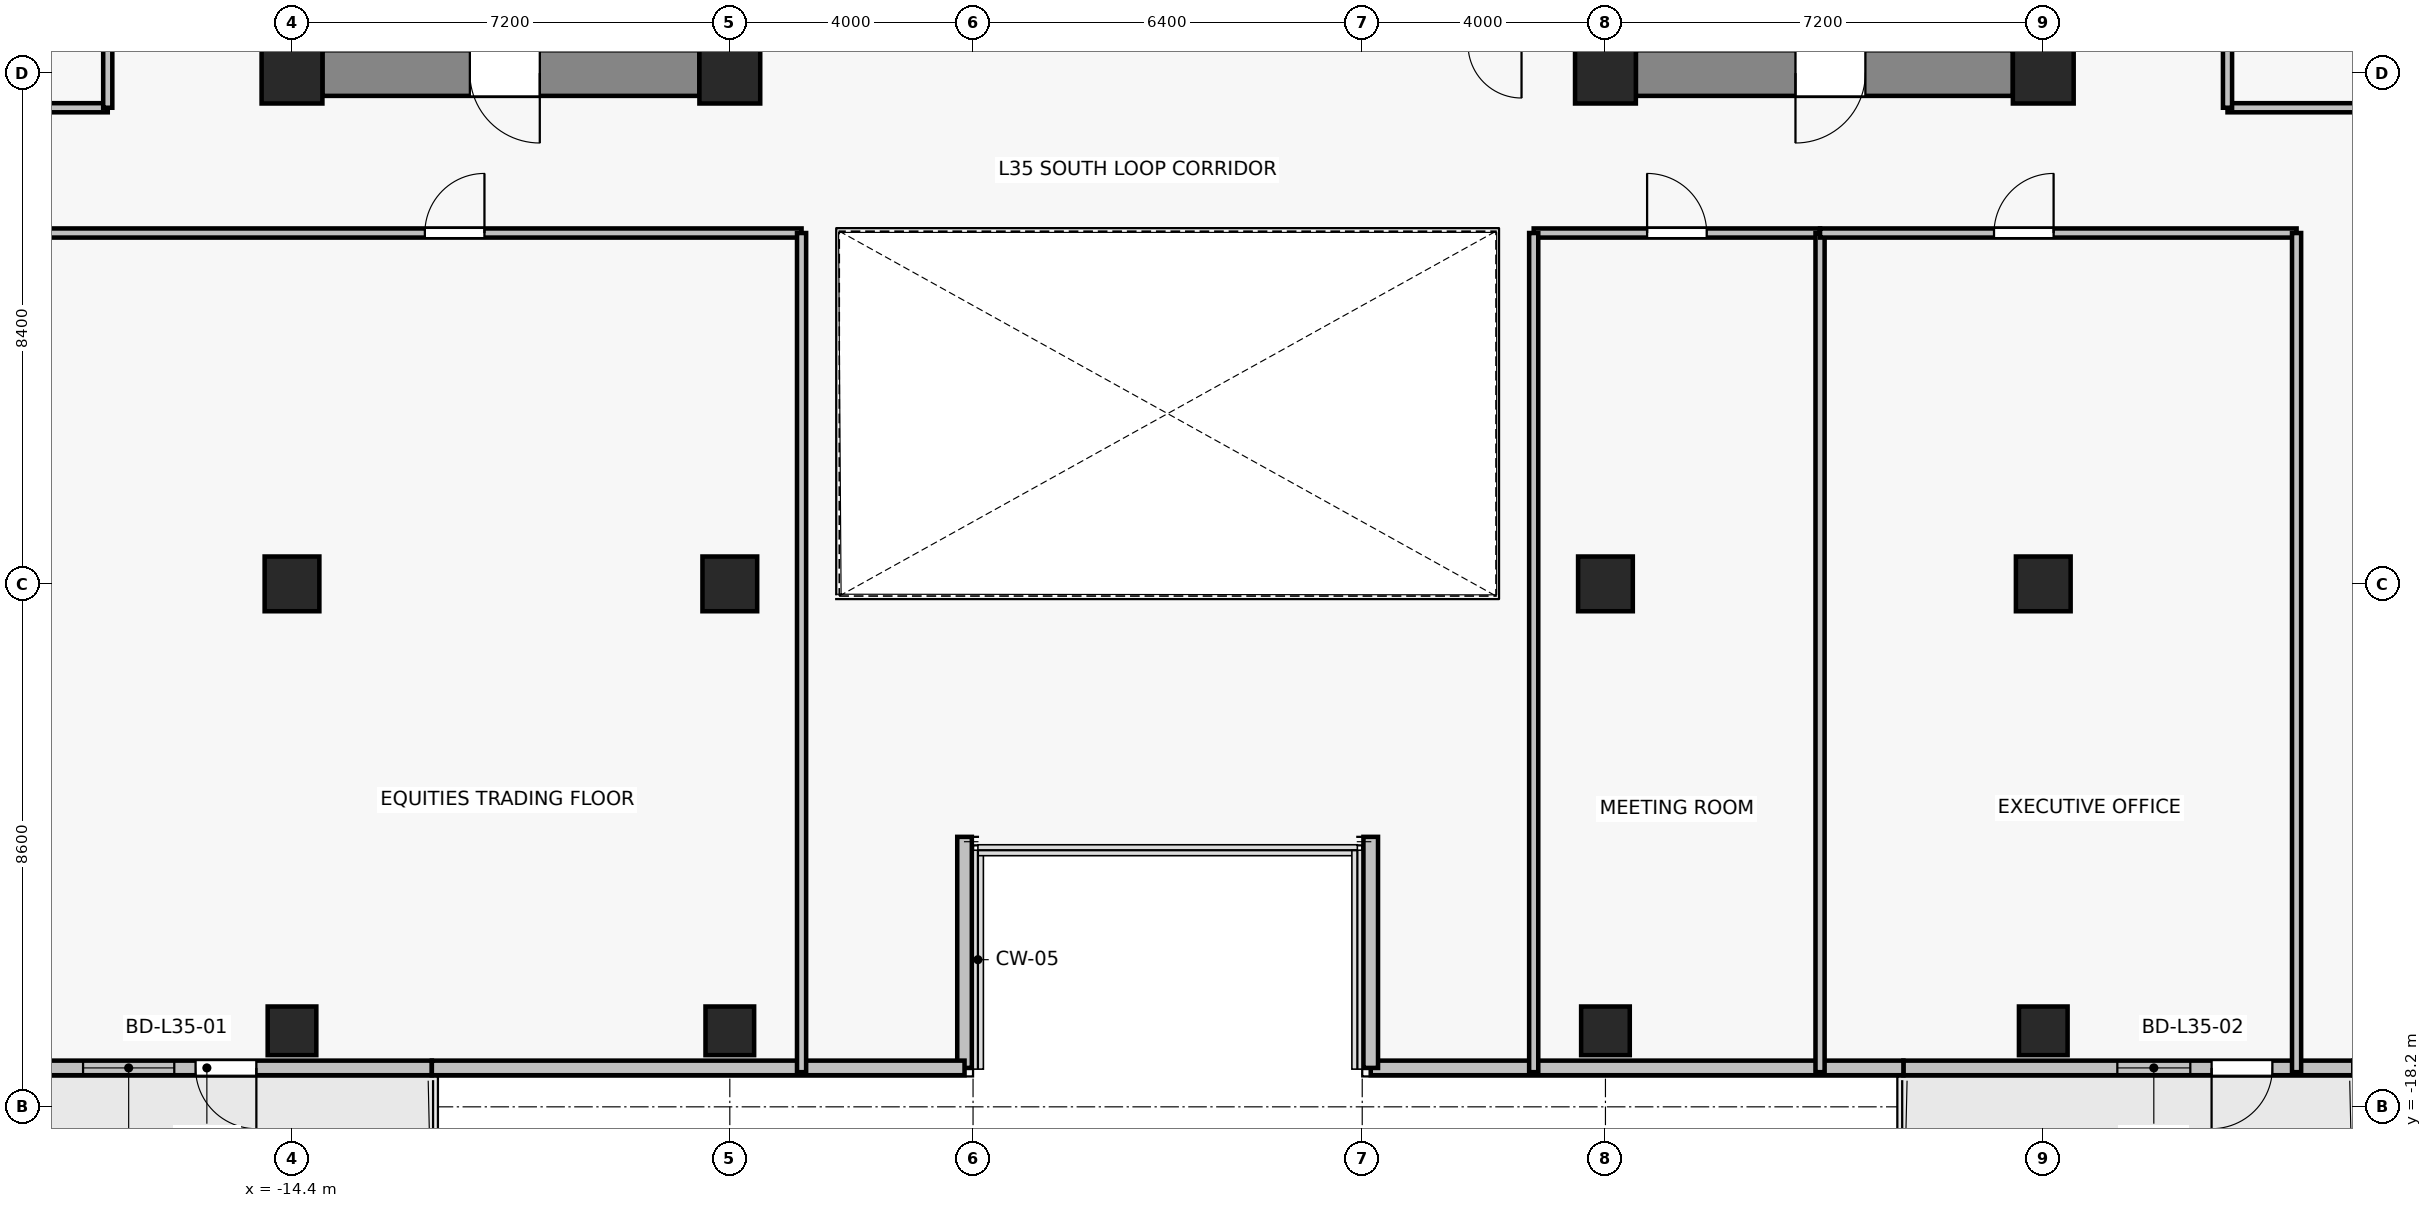
"""IFC4 building model, lengths in metres.
Left out: names, types, materials, properties, quantities, classifications, styles, units other than length and angle.
Written with IfcOpenShell. Run it as: python <this file> out.ifc"""

import sys

from ifc_helpers import new_model, si_unit, direction, frame, frame_2d, origin, origin_2d, place, context, subcontext, project, spatial, rectangle, extrude, source, transform, mapped, element, fill, save


model = new_model("IFC4")
c1 = context("Model", 3, precision=1e-05, world=origin(), true_north=direction((0.0, 1.0)))
c2 = subcontext(c1, "Body", "Model", "MODEL_VIEW")
j1 = project(units=[si_unit("LENGTHUNIT", "METRE"), si_unit("PLANEANGLEUNIT", "RADIAN")], contexts=[c1])
p1 = place(None, origin())
s1 = spatial("IfcSite", under=j1, at=p1, CompositionType="ELEMENT")
p2 = place(p1, origin())
s2 = spatial("IfcBuilding", under=s1, at=p2, CompositionType="ELEMENT")
p3 = place(p2, frame((0.0, 0.0, 126.4)))
s3 = spatial("IfcBuildingStorey", under=s2, at=p3, CompositionType="ELEMENT", Elevation=126.4)
for number, where, z_axis, x_axis in (
    (1, (-14.4, -1.2, 0.0), (0.0, 0.0, 1.0), (1.0, 0.0, 0.0)),
    (2, (-7.2, -1.2, 0.0), (0.0, 0.0, 1.0), (1.0, 0.0, 0.0)),
    (3, (7.2, -1.2, 0.0), (0.0, 0.0, 1.0), (1.0, 0.0, 0.0)),
    (4, (14.4, -1.2, 0.0), (0.0, 0.0, 1.0), (1.0, 0.0, 0.0)),
):
    element("IfcColumn", number, at=place(p3, frame(where, z_axis=z_axis, x_axis=x_axis)), inside=s3, PredefinedType="COLUMN", context=c2, shape_type="SweptSolid", body=[
        extrude(rectangle(XDim=1.0, YDim=1.0, at=origin_2d()), origin(), (0.0, 0.0, 1.0), 3.3),
    ])
for number, where, z_axis, x_axis in (
    (5, (-14.4, -9.6, 0.0), (0.0, 0.0, 1.0), (1.0, 0.0, 0.0)),
    (6, (-7.2, -9.6, 0.0), (0.0, 0.0, 1.0), (1.0, 0.0, 0.0)),
    (7, (7.2, -9.6, 0.0), (0.0, 0.0, 1.0), (1.0, 0.0, 0.0)),
    (8, (14.4, -9.6, 0.0), (0.0, 0.0, 1.0), (1.0, 0.0, 0.0)),
):
    element("IfcColumn", number, at=place(p3, frame(where, z_axis=z_axis, x_axis=x_axis)), inside=s3, PredefinedType="COLUMN", context=c2, shape_type="SweptSolid", body=[
        extrude(rectangle(XDim=0.9, YDim=0.9, at=origin_2d()), origin(), (0.0, 0.0, 1.0), 3.3),
    ])
for number, where, z_axis, x_axis in (
    (9, (-14.4, -16.95, 0.0), (0.0, 0.0, 1.0), (1.0, 0.0, 0.0)),
    (10, (-7.2, -16.95, 0.0), (0.0, 0.0, 1.0), (1.0, 0.0, 0.0)),
    (11, (7.2, -16.95, 0.0), (0.0, 0.0, 1.0), (1.0, 0.0, 0.0)),
    (12, (14.4, -16.95, 0.0), (0.0, 0.0, 1.0), (1.0, 0.0, 0.0)),
):
    element("IfcColumn", number, at=place(p3, frame(where, z_axis=z_axis, x_axis=x_axis)), inside=s3, PredefinedType="COLUMN", context=c2, shape_type="SweptSolid", body=[
        extrude(rectangle(XDim=0.8, YDim=0.8, at=origin_2d()), origin(), (0.0, 0.0, 1.0), 3.3),
    ])
p4 = place(p3, frame((-7.7, -1.2, 0.0), z_axis=(0.0, 0.0, 1.0), x_axis=(-1.0, 0.0, 0.0)))
e13 = element("IfcWall", 13, at=p4, inside=s3, PredefinedType="SHEAR", context=c2, shape_type="SweptSolid", body=[
    extrude(rectangle(XDim=6.2, YDim=0.75, at=frame_2d((3.1, 0.0))), origin(), (0.0, 0.0, 1.0), 3.075),
])
p5 = place(p4, frame((2.625, 0.0, 0.0)))
e14 = element("IfcOpeningElement", 14, at=p5, cuts=e13, PredefinedType="OPENING", context=c2, shape_type="SweptSolid", body=[
    extrude(rectangle(XDim=1.15, YDim=2.15, at=frame_2d((0.575, 1.075))), frame((0.0, 0.385, 0.0), z_axis=(0.0, -1.0, 0.0), x_axis=(1.0, 0.0, 0.0)), (0.0, 0.0, 1.0), 0.77),
])
p6 = place(p3, frame((13.9, -1.2, 0.0), z_axis=(0.0, 0.0, 1.0), x_axis=(-1.0, 0.0, 0.0)))
e15 = element("IfcWall", 15, at=p6, inside=s3, PredefinedType="SHEAR", context=c2, shape_type="SweptSolid", body=[
    extrude(rectangle(XDim=6.2, YDim=0.75, at=frame_2d((3.1, 0.0))), origin(), (0.0, 0.0, 1.0), 3.075),
])
p7 = place(p6, frame((2.425, 0.0, 0.0)))
e16 = element("IfcOpeningElement", 16, at=p7, cuts=e15, PredefinedType="OPENING", context=c2, shape_type="SweptSolid", body=[
    extrude(rectangle(XDim=1.15, YDim=2.15, at=frame_2d((0.575, 1.075))), frame((0.0, 0.385, 0.0), z_axis=(0.0, -1.0, 0.0), x_axis=(1.0, 0.0, 0.0)), (0.0, 0.0, 1.0), 0.77),
])
p8 = place(p3, frame((-12.1, -17.56, 0.0), z_axis=(0.0, 0.0, 1.0), x_axis=(-1.0, 0.0, 0.0)))
e17 = element("IfcWall", 17, at=p8, inside=s3, PredefinedType="SOLIDWALL", context=c2, shape_type="SweptSolid", body=[
    extrude(rectangle(XDim=7.4, YDim=0.24, at=frame_2d((3.7, 0.0))), origin(), (0.0, 0.0, 1.0), 2.665),
])
p9 = place(p8, frame((2.886, 0.0, 0.0)))
e18 = element("IfcOpeningElement", 18, at=p9, cuts=e17, PredefinedType="OPENING", context=c2, shape_type="SweptSolid", body=[
    extrude(rectangle(XDim=1.0, YDim=2.2, at=frame_2d((0.5, 1.1))), frame((0.0, 0.13, 0.0), z_axis=(0.0, -1.0, 0.0), x_axis=(1.0, 0.0, 0.0)), (0.0, 0.0, 1.0), 0.26),
])
p10 = place(p8, frame((4.236, 0.0, 0.85)))
e19 = element("IfcOpeningElement", 19, at=p10, cuts=e17, PredefinedType="OPENING", context=c2, shape_type="SweptSolid", body=[
    extrude(rectangle(XDim=1.5, YDim=1.6, at=frame_2d((0.75, 0.8))), frame((0.0, 0.13, 0.0), z_axis=(0.0, -1.0, 0.0), x_axis=(1.0, 0.0, 0.0)), (0.0, 0.0, 1.0), 0.26),
])
p11 = place(p3, frame((19.5, -17.56, 0.0), z_axis=(0.0, 0.0, 1.0), x_axis=(-1.0, 0.0, 0.0)))
e20 = element("IfcWall", 20, at=p11, inside=s3, PredefinedType="SOLIDWALL", context=c2, shape_type="SweptSolid", body=[
    extrude(rectangle(XDim=7.4, YDim=0.24, at=frame_2d((3.7, 0.0))), origin(), (0.0, 0.0, 1.0), 2.665),
])
p12 = place(p11, frame((1.332, 0.0, 0.0)))
e21 = element("IfcOpeningElement", 21, at=p12, cuts=e20, PredefinedType="OPENING", context=c2, shape_type="SweptSolid", body=[
    extrude(rectangle(XDim=1.0, YDim=2.2, at=frame_2d((0.5, 1.1))), frame((0.0, 0.13, 0.0), z_axis=(0.0, -1.0, 0.0), x_axis=(1.0, 0.0, 0.0)), (0.0, 0.0, 1.0), 0.26),
])
p13 = place(p11, frame((2.682, 0.0, 0.85)))
e22 = element("IfcOpeningElement", 22, at=p13, cuts=e20, PredefinedType="OPENING", context=c2, shape_type="SweptSolid", body=[
    extrude(rectangle(XDim=1.2, YDim=1.5, at=frame_2d((0.6, 0.75))), frame((0.0, 0.13, 0.0), z_axis=(0.0, -1.0, 0.0), x_axis=(1.0, 0.0, 0.0)), (0.0, 0.0, 1.0), 0.26),
])
p14 = place(p3, frame((3.34, -17.56, 0.0), z_axis=(0.0, 0.0, 1.0), x_axis=(1.0, 0.0, 0.0)))
e23 = element("IfcWall", 23, at=p14, inside=s3, PredefinedType="SOLIDWALL", context=c2, shape_type="SweptSolid", body=[
    extrude(rectangle(XDim=8.76, YDim=0.24, at=frame_2d((4.38, 0.0))), origin(), (0.0, 0.0, 1.0), 3.075),
])
for number, where, z_axis, x_axis in (
    (24, (3.34, -13.76, 0.0), (0.0, 0.0, 1.0), (0.0, -1.0, 0.0)),
    (25, (-3.34, -17.56, 0.0), (0.0, 0.0, 1.0), (0.0, 1.0, 0.0)),
):
    element("IfcWall", number, at=place(p3, frame(where, z_axis=z_axis, x_axis=x_axis)), inside=s3, PredefinedType="SOLIDWALL", context=c2, shape_type="SweptSolid", body=[
        extrude(rectangle(XDim=3.8, YDim=0.24, at=frame_2d((1.9, 0.0))), origin(), (0.0, 0.0, 1.0), 2.515),
    ])
p15 = place(p3, frame((-12.1, -17.56, 0.0), z_axis=(0.0, 0.0, 1.0), x_axis=(1.0, 0.0, 0.0)))
e26 = element("IfcWall", 26, at=p15, inside=s3, PredefinedType="SOLIDWALL", context=c2, shape_type="SweptSolid", body=[
    extrude(rectangle(XDim=8.76, YDim=0.24, at=frame_2d((4.38, 0.0))), origin(), (0.0, 0.0, 1.0), 3.075),
])
p16 = place(p3, frame((-25.53, -3.83, 0.0), z_axis=(0.0, 0.0, 1.0), x_axis=(1.0, 0.0, 0.0)))
e27 = element("IfcWall", 27, at=p16, inside=s3, PredefinedType="PARTITIONING", context=c2, shape_type="SweptSolid", body=[
    extrude(rectangle(XDim=19.51, YDim=0.15, at=frame_2d((9.755, 0.0))), origin(), (0.0, 0.0, 1.0), 2.515),
])
p17 = place(p16, frame((13.315, 0.0, 0.0)))
e28 = element("IfcOpeningElement", 28, at=p17, cuts=e27, PredefinedType="OPENING", context=c2, shape_type="SweptSolid", body=[
    extrude(rectangle(XDim=0.98, YDim=2.15, at=frame_2d((0.49, 1.075))), frame((0.0, 0.085, 0.0), z_axis=(0.0, -1.0, 0.0), x_axis=(1.0, 0.0, 0.0)), (0.0, 0.0, 1.0), 0.17),
])
p18 = place(p3, frame((-6.02, -3.83, 0.0), z_axis=(0.0, 0.0, 1.0), x_axis=(0.0, -1.0, 0.0)))
e29 = element("IfcWall", 29, at=p18, inside=s3, PredefinedType="PARTITIONING", context=c2, shape_type="SweptSolid", body=[
    extrude(rectangle(XDim=13.8, YDim=0.15, at=frame_2d((6.9, 0.0))), origin(), (0.0, 0.0, 1.0), 2.515),
])
p19 = place(p3, frame((6.02, -3.83, 0.0), z_axis=(0.0, 0.0, 1.0), x_axis=(1.0, 0.0, 0.0)))
e30 = element("IfcWall", 30, at=p19, inside=s3, PredefinedType="PARTITIONING", context=c2, shape_type="SweptSolid", body=[
    extrude(rectangle(XDim=4.709, YDim=0.15, at=frame_2d((2.354, 0.0))), origin(), (0.0, 0.0, 1.0), 2.515),
])
p20 = place(p19, frame((1.865, 0.0, 0.0)))
e31 = element("IfcOpeningElement", 31, at=p20, cuts=e30, PredefinedType="OPENING", context=c2, shape_type="SweptSolid", body=[
    extrude(rectangle(XDim=0.98, YDim=2.15, at=frame_2d((0.49, 1.075))), frame((0.0, 0.085, 0.0), z_axis=(0.0, -1.0, 0.0), x_axis=(1.0, 0.0, 0.0)), (0.0, 0.0, 1.0), 0.17),
])
for number, where, z_axis, x_axis in (
    (32, (6.02, -17.63, 0.0), (0.0, 0.0, 1.0), (0.0, 1.0, 0.0)),
    (33, (10.729, -3.83, 0.0), (0.0, 0.0, 1.0), (0.0, -1.0, 0.0)),
):
    element("IfcWall", number, at=place(p3, frame(where, z_axis=z_axis, x_axis=x_axis)), inside=s3, PredefinedType="PARTITIONING", context=c2, shape_type="SweptSolid", body=[
        extrude(rectangle(XDim=13.8, YDim=0.15, at=frame_2d((6.9, 0.0))), origin(), (0.0, 0.0, 1.0), 2.515),
    ])
p21 = place(p3, frame((10.729, -3.83, 0.0), z_axis=(0.0, 0.0, 1.0), x_axis=(1.0, 0.0, 0.0)))
e34 = element("IfcWall", 34, at=p21, inside=s3, PredefinedType="PARTITIONING", context=c2, shape_type="SweptSolid", body=[
    extrude(rectangle(XDim=7.837, YDim=0.15, at=frame_2d((3.918, 0.0))), origin(), (0.0, 0.0, 1.0), 2.515),
])
p22 = place(p21, frame((2.861, 0.0, 0.0)))
e35 = element("IfcOpeningElement", 35, at=p22, cuts=e34, PredefinedType="OPENING", context=c2, shape_type="SweptSolid", body=[
    extrude(rectangle(XDim=0.98, YDim=2.15, at=frame_2d((0.49, 1.075))), frame((0.0, 0.085, 0.0), z_axis=(0.0, -1.0, 0.0), x_axis=(1.0, 0.0, 0.0)), (0.0, 0.0, 1.0), 0.17),
])
p23 = place(p3, frame((18.566, -3.83, 0.0), z_axis=(0.0, 0.0, 1.0), x_axis=(0.0, -1.0, 0.0)))
e36 = element("IfcWall", 36, at=p23, inside=s3, PredefinedType="PARTITIONING", context=c2, shape_type="SweptSolid", body=[
    extrude(rectangle(XDim=13.8, YDim=0.15, at=frame_2d((6.9, 0.0))), origin(), (0.0, 0.0, 1.0), 2.515),
])
p24 = place(p3, frame((-17.43, -1.77, 0.0), z_axis=(0.0, 0.0, 1.0), x_axis=(-1.0, 0.0, 0.0)))
e37 = element("IfcWall", 37, at=p24, inside=s3, PredefinedType="PARTITIONING", context=c2, shape_type="SweptSolid", body=[
    extrude(rectangle(XDim=8.1, YDim=0.15, at=frame_2d((4.05, 0.0))), origin(), (0.0, 0.0, 1.0), 2.515),
])
p25 = place(p3, frame((-17.43, 13.88, 0.0), z_axis=(0.0, 0.0, 1.0), x_axis=(0.0, -1.0, 0.0)))
e38 = element("IfcWall", 38, at=p25, inside=s3, PredefinedType="PARTITIONING", context=c2, shape_type="SweptSolid", body=[
    extrude(rectangle(XDim=15.65, YDim=0.15, at=frame_2d((7.825, 0.0))), origin(), (0.0, 0.0, 1.0), 2.515),
])
p26 = place(p25, frame((7.335, 0.0, 0.0)))
e39 = element("IfcOpeningElement", 39, at=p26, cuts=e38, PredefinedType="OPENING", context=c2, shape_type="SweptSolid", body=[
    extrude(rectangle(XDim=0.98, YDim=2.15, at=frame_2d((0.49, 1.075))), frame((0.0, 0.085, 0.0), z_axis=(0.0, -1.0, 0.0), x_axis=(1.0, 0.0, 0.0)), (0.0, 0.0, 1.0), 0.17),
])
p27 = place(p3, frame((29.53, -1.77, 0.0), z_axis=(0.0, 0.0, 1.0), x_axis=(-1.0, 0.0, 0.0)))
e40 = element("IfcWall", 40, at=p27, inside=s3, PredefinedType="PARTITIONING", context=c2, shape_type="SweptSolid", body=[
    extrude(rectangle(XDim=12.1, YDim=0.15, at=frame_2d((6.05, 0.0))), origin(), (0.0, 0.0, 1.0), 2.515),
])
p28 = place(p3, frame((17.43, -1.77, 0.0), z_axis=(0.0, 0.0, 1.0), x_axis=(0.0, 1.0, 0.0)))
e41 = element("IfcWall", 41, at=p28, inside=s3, PredefinedType="PARTITIONING", context=c2, shape_type="SweptSolid", body=[
    extrude(rectangle(XDim=3.23, YDim=0.15, at=frame_2d((1.615, 0.0))), origin(), (0.0, 0.0, 1.0), 2.515),
])
p29 = place(p28, frame((1.125, 0.0, 0.0)))
e42 = element("IfcOpeningElement", 42, at=p29, cuts=e41, PredefinedType="OPENING", context=c2, shape_type="SweptSolid", body=[
    extrude(rectangle(XDim=0.98, YDim=2.15, at=frame_2d((0.49, 1.075))), frame((0.0, 0.085, 0.0), z_axis=(0.0, -1.0, 0.0), x_axis=(1.0, 0.0, 0.0)), (0.0, 0.0, 1.0), 0.17),
])
m1 = source(origin(), c2, "Body", "SweptSolid", [
    extrude(rectangle(XDim=1.0, YDim=2.2, at=frame_2d((0.5, 1.1))), frame((0.0, 0.025, 0.0), z_axis=(0.0, -1.0, 0.0), x_axis=(1.0, 0.0, 0.0)), (0.0, 0.0, 1.0), 0.05),
])
p30 = place(p9, origin())
e43 = element("IfcDoor", 43, at=p30, inside=s3, OperationType="SINGLE_SWING_LEFT", PredefinedType="DOOR", context=c2, shape_type="MappedRepresentation", body=[
    mapped(m1, transform((0.0, 0.0, 0.0), x_axis=(1.0, 0.0, 0.0), y_axis=(0.0, 1.0, 0.0), z_axis=(0.0, 0.0, 1.0), scale=1.0)),
])
fill(e18, e43)
m2 = source(origin(), c2, "Body", "SweptSolid", [
    extrude(rectangle(XDim=1.5, YDim=1.6, at=frame_2d((0.75, 0.8))), frame((0.0, 0.03, 0.0), z_axis=(0.0, -1.0, 0.0), x_axis=(1.0, 0.0, 0.0)), (0.0, 0.0, 1.0), 0.06),
])
p31 = place(p10, origin())
e44 = element("IfcWindow", 44, at=p31, inside=s3, PartitioningType="SINGLE_PANEL", PredefinedType="WINDOW", context=c2, shape_type="MappedRepresentation", body=[
    mapped(m2, transform((0.0, 0.0, 0.0), x_axis=(1.0, 0.0, 0.0), y_axis=(0.0, 1.0, 0.0), z_axis=(0.0, 0.0, 1.0), scale=1.0)),
])
fill(e19, e44)
p32 = place(p12, origin())
e45 = element("IfcDoor", 45, at=p32, inside=s3, OperationType="SINGLE_SWING_RIGHT", PredefinedType="DOOR", context=c2, shape_type="MappedRepresentation", body=[
    mapped(m1, transform((0.0, 0.0, 0.0), x_axis=(1.0, 0.0, 0.0), y_axis=(0.0, 1.0, 0.0), z_axis=(0.0, 0.0, 1.0), scale=1.0)),
])
fill(e21, e45)
m3 = source(origin(), c2, "Body", "SweptSolid", [
    extrude(rectangle(XDim=1.2, YDim=1.5, at=frame_2d((0.6, 0.75))), frame((0.0, 0.03, 0.0), z_axis=(0.0, -1.0, 0.0), x_axis=(1.0, 0.0, 0.0)), (0.0, 0.0, 1.0), 0.06),
])
p33 = place(p13, origin())
e46 = element("IfcWindow", 46, at=p33, inside=s3, PartitioningType="SINGLE_PANEL", PredefinedType="WINDOW", context=c2, shape_type="MappedRepresentation", body=[
    mapped(m3, transform((0.0, 0.0, 0.0), x_axis=(1.0, 0.0, 0.0), y_axis=(0.0, 1.0, 0.0), z_axis=(0.0, 0.0, 1.0), scale=1.0)),
])
fill(e22, e46)
m4 = source(origin(), c2, "Body", "SweptSolid", [
    extrude(rectangle(XDim=1.15, YDim=2.15, at=frame_2d((0.575, 1.075))), frame((0.0, 0.025, 0.0), z_axis=(0.0, -1.0, 0.0), x_axis=(1.0, 0.0, 0.0)), (0.0, 0.0, 1.0), 0.05),
])
p34 = place(p5, origin())
e47 = element("IfcDoor", 47, at=p34, inside=s3, OperationType="SINGLE_SWING_LEFT", PredefinedType="DOOR", context=c2, shape_type="MappedRepresentation", body=[
    mapped(m4, transform((0.0, 0.0, 0.0), x_axis=(1.0, 0.0, 0.0), y_axis=(0.0, 1.0, 0.0), z_axis=(0.0, 0.0, 1.0), scale=1.0)),
])
fill(e14, e47)
p35 = place(p7, origin())
e48 = element("IfcDoor", 48, at=p35, inside=s3, OperationType="SINGLE_SWING_RIGHT", PredefinedType="DOOR", context=c2, shape_type="MappedRepresentation", body=[
    mapped(m4, transform((0.0, 0.0, 0.0), x_axis=(1.0, 0.0, 0.0), y_axis=(0.0, 1.0, 0.0), z_axis=(0.0, 0.0, 1.0), scale=1.0)),
])
fill(e16, e48)
m5 = source(origin(), c2, "Body", "SweptSolid", [
    extrude(rectangle(XDim=0.98, YDim=2.15, at=frame_2d((0.49, 1.075))), frame((0.0, 0.025, 0.0), z_axis=(0.0, -1.0, 0.0), x_axis=(1.0, 0.0, 0.0)), (0.0, 0.0, 1.0), 0.05),
])
p36 = place(p17, origin())
e49 = element("IfcDoor", 49, at=p36, inside=s3, OperationType="SINGLE_SWING_RIGHT", PredefinedType="DOOR", context=c2, shape_type="MappedRepresentation", body=[
    mapped(m5, transform((0.0, 0.0, 0.0), x_axis=(1.0, 0.0, 0.0), y_axis=(0.0, 1.0, 0.0), z_axis=(0.0, 0.0, 1.0), scale=1.0)),
])
fill(e28, e49)
p37 = place(p20, origin())
e50 = element("IfcDoor", 50, at=p37, inside=s3, OperationType="SINGLE_SWING_LEFT", PredefinedType="DOOR", context=c2, shape_type="MappedRepresentation", body=[
    mapped(m5, transform((0.0, 0.0, 0.0), x_axis=(1.0, 0.0, 0.0), y_axis=(0.0, 1.0, 0.0), z_axis=(0.0, 0.0, 1.0), scale=1.0)),
])
fill(e31, e50)
p38 = place(p22, origin())
e51 = element("IfcDoor", 51, at=p38, inside=s3, OperationType="SINGLE_SWING_RIGHT", PredefinedType="DOOR", context=c2, shape_type="MappedRepresentation", body=[
    mapped(m5, transform((0.0, 0.0, 0.0), x_axis=(1.0, 0.0, 0.0), y_axis=(0.0, 1.0, 0.0), z_axis=(0.0, 0.0, 1.0), scale=1.0)),
])
fill(e35, e51)
save(model, sys.argv[1])
